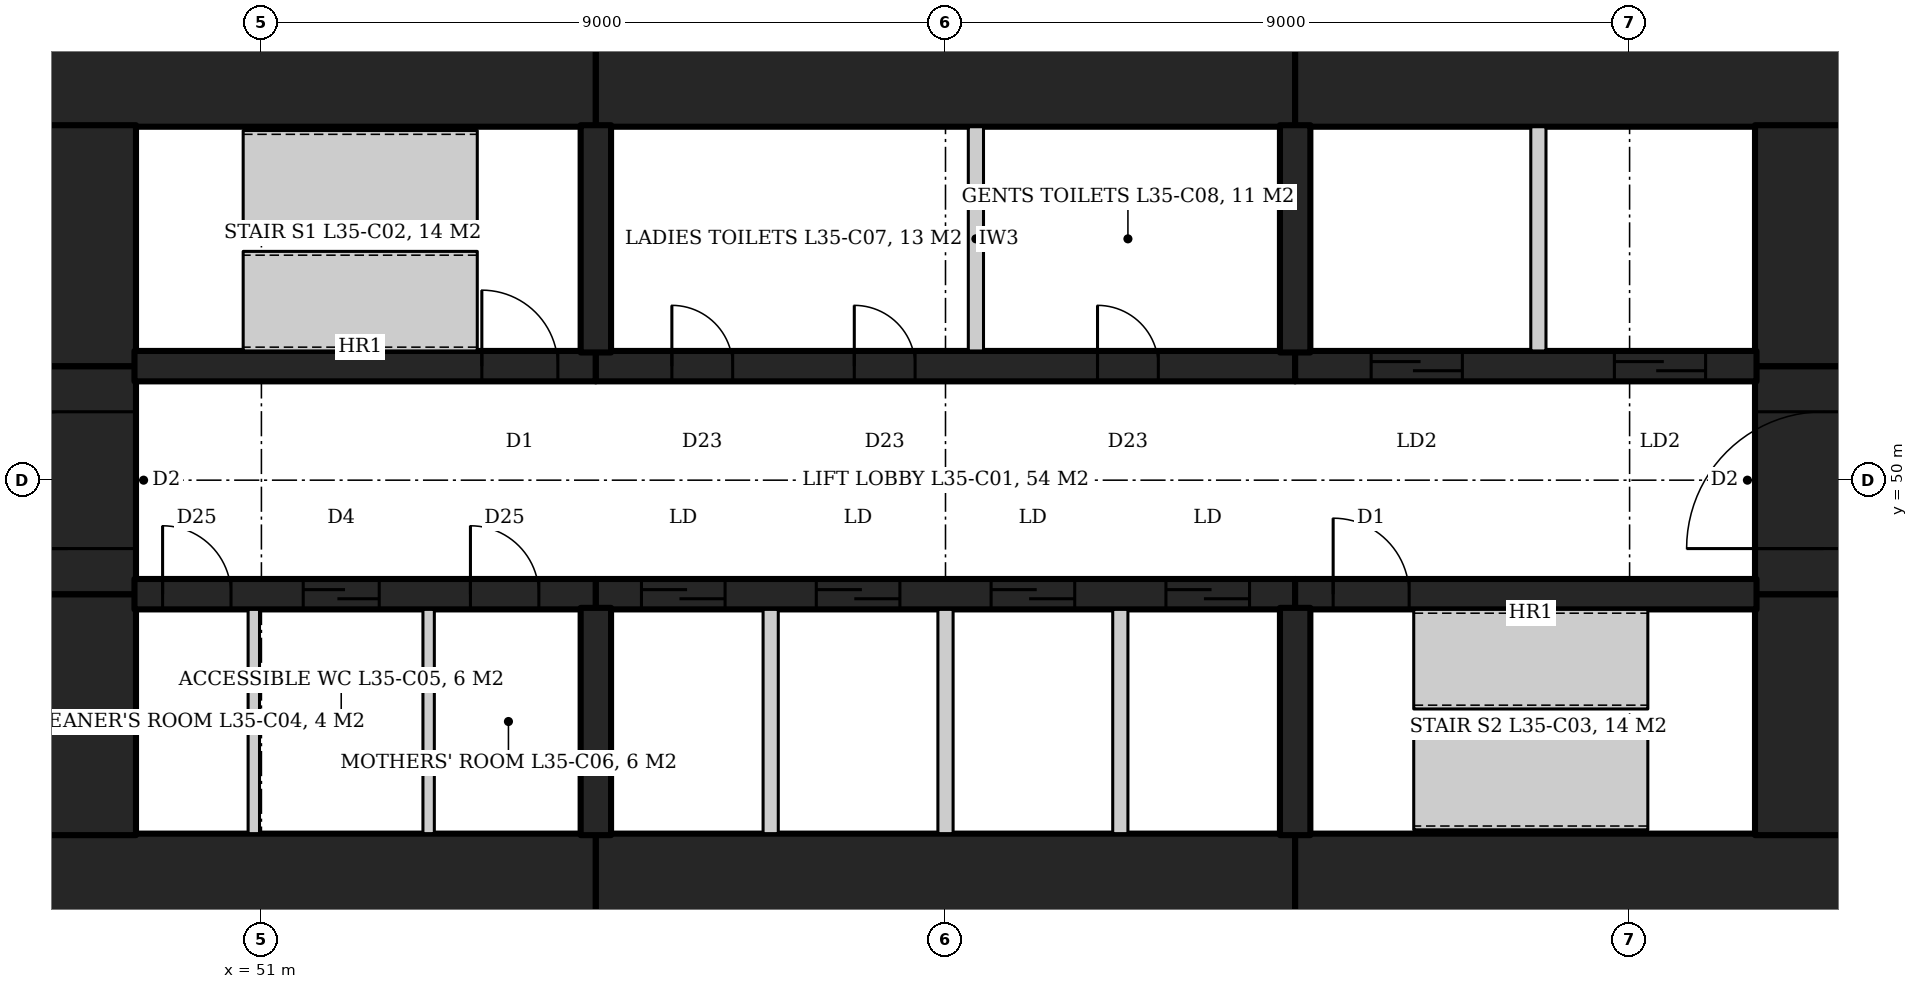
"""IFC4 building model, lengths in metres.
Left out: names, types, materials, properties, quantities, classifications, styles, units other than length and angle.
Written with IfcOpenShell. Run it as: python <this file> out.ifc"""

import sys

from ifc_helpers import new_model, si_unit, direction, frame, frame_2d, origin, place, context, subcontext, project, spatial, rectangle, extrude, element, fill, save


model = new_model("IFC4")
c1 = context("Model", 3, precision=1e-05, world=origin(), true_north=direction((0.0, 1.0)))
c2 = subcontext(c1, "Body", "Model", "MODEL_VIEW")
j1 = project(units=[si_unit("LENGTHUNIT", "METRE"), si_unit("PLANEANGLEUNIT", "RADIAN")], contexts=[c1])
p1 = place(None, origin())
s1 = spatial("IfcSite", under=j1, at=p1, CompositionType="ELEMENT")
p2 = place(p1, origin())
s2 = spatial("IfcBuilding", under=s1, at=p2, CompositionType="ELEMENT")
p3 = place(p2, frame((0.0, 0.0, 147.8)))
s3 = spatial("IfcBuildingStorey", under=s2, at=p3, CompositionType="ELEMENT", Elevation=147.8)
p4 = place(p3, frame((47.55, 55.55, 0.0), z_axis=(0.0, 0.0, 1.0), x_axis=(1.0, 0.0, 0.0)))
e1 = element("IfcWall", 1, at=p4, inside=s3, PredefinedType="SHEAR", context=c2, shape_type="SweptSolid", body=[
    extrude(rectangle(XDim=7.85, YDim=1.8, at=frame_2d((3.925, 0.0))), origin(), (0.0, 0.0, 1.0), 4.2),
])
p5 = place(p3, frame((55.4, 55.55, 0.0), z_axis=(0.0, 0.0, 1.0), x_axis=(1.0, 0.0, 0.0)))
e2 = element("IfcWall", 2, at=p5, inside=s3, PredefinedType="SHEAR", context=c2, shape_type="SweptSolid", body=[
    extrude(rectangle(XDim=9.2, YDim=1.8, at=frame_2d((4.6, 0.0))), origin(), (0.0, 0.0, 1.0), 4.2),
])
for number, where, z_axis, x_axis in (
    (3, (64.6, 55.55, 0.0), (0.0, 0.0, 1.0), (1.0, 0.0, 0.0)),
    (4, (47.55, 44.45, 0.0), (0.0, 0.0, 1.0), (1.0, 0.0, 0.0)),
):
    element("IfcWall", number, at=place(p3, frame(where, z_axis=z_axis, x_axis=x_axis)), inside=s3, PredefinedType="SHEAR", context=c2, shape_type="SweptSolid", body=[
        extrude(rectangle(XDim=7.85, YDim=1.8, at=frame_2d((3.925, 0.0))), origin(), (0.0, 0.0, 1.0), 4.2),
    ])
p6 = place(p3, frame((55.4, 44.45, 0.0), z_axis=(0.0, 0.0, 1.0), x_axis=(1.0, 0.0, 0.0)))
e5 = element("IfcWall", 5, at=p6, inside=s3, PredefinedType="SHEAR", context=c2, shape_type="SweptSolid", body=[
    extrude(rectangle(XDim=9.2, YDim=1.8, at=frame_2d((4.6, 0.0))), origin(), (0.0, 0.0, 1.0), 4.2),
])
p7 = place(p3, frame((64.6, 44.45, 0.0), z_axis=(0.0, 0.0, 1.0), x_axis=(1.0, 0.0, 0.0)))
e6 = element("IfcWall", 6, at=p7, inside=s3, PredefinedType="SHEAR", context=c2, shape_type="SweptSolid", body=[
    extrude(rectangle(XDim=7.85, YDim=1.8, at=frame_2d((3.925, 0.0))), origin(), (0.0, 0.0, 1.0), 4.2),
])
p8 = place(p3, frame((71.55, 45.33, 0.0), z_axis=(0.0, 0.0, 1.0), x_axis=(0.0, 1.0, 0.0)))
e7 = element("IfcWall", 7, at=p8, inside=s3, PredefinedType="SHEAR", context=c2, shape_type="SweptSolid", body=[
    extrude(rectangle(XDim=3.17, YDim=1.8, at=frame_2d((1.585, 0.0))), origin(), (0.0, 0.0, 1.0), 4.2),
])
p9 = place(p3, frame((71.55, 48.5, 0.0), z_axis=(0.0, 0.0, 1.0), x_axis=(0.0, 1.0, 0.0)))
e8 = element("IfcWall", 8, at=p9, inside=s3, PredefinedType="SHEAR", context=c2, shape_type="SweptSolid", body=[
    extrude(rectangle(XDim=3.0, YDim=1.8, at=frame_2d((1.5, 0.0))), origin(), (0.0, 0.0, 1.0), 4.2),
])
p10 = place(p9, frame((0.6, 0.0, 0.0)))
e9 = element("IfcOpeningElement", 9, at=p10, cuts=e8, PredefinedType="OPENING", context=c2, shape_type="SweptSolid", body=[
    extrude(rectangle(XDim=1.8, YDim=2.1, at=frame_2d((0.9, 1.05))), frame((0.0, 0.91, 0.0), z_axis=(0.0, -1.0, 0.0), x_axis=(1.0, 0.0, 0.0)), (0.0, 0.0, 1.0), 1.82),
])
for number, where, z_axis, x_axis in (
    (10, (71.55, 51.5, 0.0), (0.0, 0.0, 1.0), (0.0, 1.0, 0.0)),
    (11, (48.45, 45.33, 0.0), (0.0, 0.0, 1.0), (0.0, 1.0, 0.0)),
):
    element("IfcWall", number, at=place(p3, frame(where, z_axis=z_axis, x_axis=x_axis)), inside=s3, PredefinedType="SHEAR", context=c2, shape_type="SweptSolid", body=[
        extrude(rectangle(XDim=3.17, YDim=1.8, at=frame_2d((1.585, 0.0))), origin(), (0.0, 0.0, 1.0), 4.2),
    ])
p11 = place(p3, frame((48.45, 48.5, 0.0), z_axis=(0.0, 0.0, 1.0), x_axis=(0.0, 1.0, 0.0)))
e12 = element("IfcWall", 12, at=p11, inside=s3, PredefinedType="SHEAR", context=c2, shape_type="SweptSolid", body=[
    extrude(rectangle(XDim=3.0, YDim=1.8, at=frame_2d((1.5, 0.0))), origin(), (0.0, 0.0, 1.0), 4.2),
])
p12 = place(p11, frame((0.6, 0.0, 0.0)))
e13 = element("IfcOpeningElement", 13, at=p12, cuts=e12, PredefinedType="OPENING", context=c2, shape_type="SweptSolid", body=[
    extrude(rectangle(XDim=1.8, YDim=2.1, at=frame_2d((0.9, 1.05))), frame((0.0, 0.91, 0.0), z_axis=(0.0, -1.0, 0.0), x_axis=(1.0, 0.0, 0.0)), (0.0, 0.0, 1.0), 1.82),
])
p13 = place(p3, frame((48.45, 51.5, 0.0), z_axis=(0.0, 0.0, 1.0), x_axis=(0.0, 1.0, 0.0)))
e14 = element("IfcWall", 14, at=p13, inside=s3, PredefinedType="SHEAR", context=c2, shape_type="SweptSolid", body=[
    extrude(rectangle(XDim=3.17, YDim=1.8, at=frame_2d((1.585, 0.0))), origin(), (0.0, 0.0, 1.0), 4.2),
])
p14 = place(p3, frame((49.33, 51.5, 0.0), z_axis=(0.0, 0.0, 1.0), x_axis=(1.0, 0.0, 0.0)))
e15 = element("IfcWall", 15, at=p14, inside=s3, PredefinedType="SHEAR", context=c2, shape_type="SweptSolid", body=[
    extrude(rectangle(XDim=6.07, YDim=0.4, at=frame_2d((3.035, 0.0))), origin(), (0.0, 0.0, 1.0), 4.2),
])
p15 = place(p14, frame((4.57, 0.0, 0.0)))
e16 = element("IfcOpeningElement", 16, at=p15, cuts=e15, PredefinedType="OPENING", context=c2, shape_type="SweptSolid", body=[
    extrude(rectangle(XDim=1.0, YDim=2.1, at=frame_2d((0.5, 1.05))), frame((0.0, 0.21, 0.0), z_axis=(0.0, -1.0, 0.0), x_axis=(1.0, 0.0, 0.0)), (0.0, 0.0, 1.0), 0.42),
])
p16 = place(p3, frame((55.4, 51.5, 0.0), z_axis=(0.0, 0.0, 1.0), x_axis=(1.0, 0.0, 0.0)))
e17 = element("IfcWall", 17, at=p16, inside=s3, PredefinedType="SHEAR", context=c2, shape_type="SweptSolid", body=[
    extrude(rectangle(XDim=9.2, YDim=0.4, at=frame_2d((4.6, 0.0))), origin(), (0.0, 0.0, 1.0), 4.2),
])
p17 = place(p16, frame((1.0, 0.0, 0.0)))
e18 = element("IfcOpeningElement", 18, at=p17, cuts=e17, PredefinedType="OPENING", context=c2, shape_type="SweptSolid", body=[
    extrude(rectangle(XDim=0.8, YDim=2.1, at=frame_2d((0.4, 1.05))), frame((0.0, 0.21, 0.0), z_axis=(0.0, -1.0, 0.0), x_axis=(1.0, 0.0, 0.0)), (0.0, 0.0, 1.0), 0.42),
])
p18 = place(p16, frame((3.4, 0.0, 0.0)))
e19 = element("IfcOpeningElement", 19, at=p18, cuts=e17, PredefinedType="OPENING", context=c2, shape_type="SweptSolid", body=[
    extrude(rectangle(XDim=0.8, YDim=2.1, at=frame_2d((0.4, 1.05))), frame((0.0, 0.21, 0.0), z_axis=(0.0, -1.0, 0.0), x_axis=(1.0, 0.0, 0.0)), (0.0, 0.0, 1.0), 0.42),
])
p19 = place(p16, frame((6.6, 0.0, 0.0)))
e20 = element("IfcOpeningElement", 20, at=p19, cuts=e17, PredefinedType="OPENING", context=c2, shape_type="SweptSolid", body=[
    extrude(rectangle(XDim=0.8, YDim=2.1, at=frame_2d((0.4, 1.05))), frame((0.0, 0.21, 0.0), z_axis=(0.0, -1.0, 0.0), x_axis=(1.0, 0.0, 0.0)), (0.0, 0.0, 1.0), 0.42),
])
p20 = place(p3, frame((64.6, 51.5, 0.0), z_axis=(0.0, 0.0, 1.0), x_axis=(1.0, 0.0, 0.0)))
e21 = element("IfcWall", 21, at=p20, inside=s3, PredefinedType="SHEAR", context=c2, shape_type="SweptSolid", body=[
    extrude(rectangle(XDim=6.07, YDim=0.4, at=frame_2d((3.035, 0.0))), origin(), (0.0, 0.0, 1.0), 4.2),
])
p21 = place(p20, frame((1.0, 0.0, 0.0)))
e22 = element("IfcOpeningElement", 22, at=p21, cuts=e21, PredefinedType="OPENING", context=c2, shape_type="SweptSolid", body=[
    extrude(rectangle(XDim=1.2, YDim=2.1, at=frame_2d((0.6, 1.05))), frame((0.0, 0.21, 0.0), z_axis=(0.0, -1.0, 0.0), x_axis=(1.0, 0.0, 0.0)), (0.0, 0.0, 1.0), 0.42),
])
p22 = place(p20, frame((4.2, 0.0, 0.0)))
e23 = element("IfcOpeningElement", 23, at=p22, cuts=e21, PredefinedType="OPENING", context=c2, shape_type="SweptSolid", body=[
    extrude(rectangle(XDim=1.2, YDim=2.1, at=frame_2d((0.6, 1.05))), frame((0.0, 0.21, 0.0), z_axis=(0.0, -1.0, 0.0), x_axis=(1.0, 0.0, 0.0)), (0.0, 0.0, 1.0), 0.42),
])
p23 = place(p3, frame((49.33, 48.5, 0.0), z_axis=(0.0, 0.0, 1.0), x_axis=(1.0, 0.0, 0.0)))
e24 = element("IfcWall", 24, at=p23, inside=s3, PredefinedType="SHEAR", context=c2, shape_type="SweptSolid", body=[
    extrude(rectangle(XDim=6.07, YDim=0.4, at=frame_2d((3.035, 0.0))), origin(), (0.0, 0.0, 1.0), 4.2),
])
p24 = place(p23, frame((0.37, 0.0, 0.0)))
e25 = element("IfcOpeningElement", 25, at=p24, cuts=e24, PredefinedType="OPENING", context=c2, shape_type="SweptSolid", body=[
    extrude(rectangle(XDim=0.9, YDim=2.1, at=frame_2d((0.45, 1.05))), frame((0.0, 0.21, 0.0), z_axis=(0.0, -1.0, 0.0), x_axis=(1.0, 0.0, 0.0)), (0.0, 0.0, 1.0), 0.42),
])
p25 = place(p23, frame((2.22, 0.0, 0.0)))
e26 = element("IfcOpeningElement", 26, at=p25, cuts=e24, PredefinedType="OPENING", context=c2, shape_type="SweptSolid", body=[
    extrude(rectangle(XDim=1.0, YDim=2.1, at=frame_2d((0.5, 1.05))), frame((0.0, 0.21, 0.0), z_axis=(0.0, -1.0, 0.0), x_axis=(1.0, 0.0, 0.0)), (0.0, 0.0, 1.0), 0.42),
])
p26 = place(p23, frame((4.42, 0.0, 0.0)))
e27 = element("IfcOpeningElement", 27, at=p26, cuts=e24, PredefinedType="OPENING", context=c2, shape_type="SweptSolid", body=[
    extrude(rectangle(XDim=0.9, YDim=2.1, at=frame_2d((0.45, 1.05))), frame((0.0, 0.21, 0.0), z_axis=(0.0, -1.0, 0.0), x_axis=(1.0, 0.0, 0.0)), (0.0, 0.0, 1.0), 0.42),
])
p27 = place(p3, frame((55.4, 48.5, 0.0), z_axis=(0.0, 0.0, 1.0), x_axis=(1.0, 0.0, 0.0)))
e28 = element("IfcWall", 28, at=p27, inside=s3, PredefinedType="SHEAR", context=c2, shape_type="SweptSolid", body=[
    extrude(rectangle(XDim=9.2, YDim=0.4, at=frame_2d((4.6, 0.0))), origin(), (0.0, 0.0, 1.0), 4.2),
])
p28 = place(p27, frame((0.6, 0.0, 0.0)))
e29 = element("IfcOpeningElement", 29, at=p28, cuts=e28, PredefinedType="OPENING", context=c2, shape_type="SweptSolid", body=[
    extrude(rectangle(XDim=1.1, YDim=2.1, at=frame_2d((0.55, 1.05))), frame((0.0, 0.21, 0.0), z_axis=(0.0, -1.0, 0.0), x_axis=(1.0, 0.0, 0.0)), (0.0, 0.0, 1.0), 0.42),
])
p29 = place(p27, frame((2.9, 0.0, 0.0)))
e30 = element("IfcOpeningElement", 30, at=p29, cuts=e28, PredefinedType="OPENING", context=c2, shape_type="SweptSolid", body=[
    extrude(rectangle(XDim=1.1, YDim=2.1, at=frame_2d((0.55, 1.05))), frame((0.0, 0.21, 0.0), z_axis=(0.0, -1.0, 0.0), x_axis=(1.0, 0.0, 0.0)), (0.0, 0.0, 1.0), 0.42),
])
p30 = place(p27, frame((5.2, 0.0, 0.0)))
e31 = element("IfcOpeningElement", 31, at=p30, cuts=e28, PredefinedType="OPENING", context=c2, shape_type="SweptSolid", body=[
    extrude(rectangle(XDim=1.1, YDim=2.1, at=frame_2d((0.55, 1.05))), frame((0.0, 0.21, 0.0), z_axis=(0.0, -1.0, 0.0), x_axis=(1.0, 0.0, 0.0)), (0.0, 0.0, 1.0), 0.42),
])
p31 = place(p27, frame((7.5, 0.0, 0.0)))
e32 = element("IfcOpeningElement", 32, at=p31, cuts=e28, PredefinedType="OPENING", context=c2, shape_type="SweptSolid", body=[
    extrude(rectangle(XDim=1.1, YDim=2.1, at=frame_2d((0.55, 1.05))), frame((0.0, 0.21, 0.0), z_axis=(0.0, -1.0, 0.0), x_axis=(1.0, 0.0, 0.0)), (0.0, 0.0, 1.0), 0.42),
])
p32 = place(p3, frame((64.6, 48.5, 0.0), z_axis=(0.0, 0.0, 1.0), x_axis=(1.0, 0.0, 0.0)))
e33 = element("IfcWall", 33, at=p32, inside=s3, PredefinedType="SHEAR", context=c2, shape_type="SweptSolid", body=[
    extrude(rectangle(XDim=6.07, YDim=0.4, at=frame_2d((3.035, 0.0))), origin(), (0.0, 0.0, 1.0), 4.2),
])
p33 = place(p32, frame((0.5, 0.0, 0.0)))
e34 = element("IfcOpeningElement", 34, at=p33, cuts=e33, PredefinedType="OPENING", context=c2, shape_type="SweptSolid", body=[
    extrude(rectangle(XDim=1.0, YDim=2.1, at=frame_2d((0.5, 1.05))), frame((0.0, 0.21, 0.0), z_axis=(0.0, -1.0, 0.0), x_axis=(1.0, 0.0, 0.0)), (0.0, 0.0, 1.0), 0.42),
])
for number, where, z_axis, x_axis in (
    (35, (55.4, 51.68, 0.0), (0.0, 0.0, 1.0), (0.0, 1.0, 0.0)),
    (36, (64.6, 51.68, 0.0), (0.0, 0.0, 1.0), (0.0, 1.0, 0.0)),
    (37, (55.4, 48.32, 0.0), (0.0, 0.0, 1.0), (0.0, -1.0, 0.0)),
    (38, (64.6, 48.32, 0.0), (0.0, 0.0, 1.0), (0.0, -1.0, 0.0)),
):
    element("IfcWall", number, at=place(p3, frame(where, z_axis=z_axis, x_axis=x_axis)), inside=s3, PredefinedType="SHEAR", context=c2, shape_type="SweptSolid", body=[
        extrude(rectangle(XDim=2.99, YDim=0.4, at=frame_2d((1.495, 0.0))), origin(), (0.0, 0.0, 1.0), 4.2),
    ])
for number, where, z_axis, x_axis in (
    (39, (57.7, 45.35, 0.0), (0.0, 0.0, 1.0), (0.0, 1.0, 0.0)),
    (40, (60.0, 45.35, 0.0), (0.0, 0.0, 1.0), (0.0, 1.0, 0.0)),
    (41, (62.3, 45.35, 0.0), (0.0, 0.0, 1.0), (0.0, 1.0, 0.0)),
    (42, (67.8, 51.7, 0.0), (0.0, 0.0, 1.0), (0.0, 1.0, 0.0)),
):
    element("IfcWall", number, at=place(p3, frame(where, z_axis=z_axis, x_axis=x_axis)), inside=s3, PredefinedType="PARTITIONING", context=c2, shape_type="SweptSolid", body=[
        extrude(rectangle(XDim=2.95, YDim=0.2, at=frame_2d((1.475, 0.0))), origin(), (0.0, 0.0, 1.0), 4.2),
    ])
for number, where, z_axis, x_axis in (
    (43, (50.9, 45.35, 0.0), (0.0, 0.0, 1.0), (0.0, 1.0, 0.0)),
    (44, (53.2, 45.35, 0.0), (0.0, 0.0, 1.0), (0.0, 1.0, 0.0)),
):
    element("IfcWall", number, at=place(p3, frame(where, z_axis=z_axis, x_axis=x_axis)), inside=s3, PredefinedType="PARTITIONING", context=c2, shape_type="SweptSolid", body=[
        extrude(rectangle(XDim=2.95, YDim=0.15, at=frame_2d((1.475, 0.0))), origin(), (0.0, 0.0, 1.0), 4.04),
    ])
p34 = place(p3, frame((60.4, 51.7, 0.0), z_axis=(0.0, 0.0, 1.0), x_axis=(0.0, 1.0, 0.0)))
e45 = element("IfcWall", 45, at=p34, inside=s3, PredefinedType="PARTITIONING", context=c2, shape_type="SweptSolid", body=[
    extrude(rectangle(XDim=2.95, YDim=0.2, at=frame_2d((1.475, 0.0))), origin(), (0.0, 0.0, 1.0), 4.04),
])
p35 = place(p15, origin())
e46 = element("IfcDoor", 46, at=p35, inside=s3, OperationType="SINGLE_SWING_LEFT", PredefinedType="DOOR", context=c2, shape_type="SweptSolid", body=[
    extrude(rectangle(XDim=1.0, YDim=2.1, at=frame_2d((0.5, 1.05))), frame((0.0, 0.025, 0.0), z_axis=(0.0, -1.0, 0.0), x_axis=(1.0, 0.0, 0.0)), (0.0, 0.0, 1.0), 0.05),
])
fill(e16, e46)
p36 = place(p33, origin())
e47 = element("IfcDoor", 47, at=p36, inside=s3, OperationType="SINGLE_SWING_LEFT", PredefinedType="DOOR", context=c2, shape_type="SweptSolid", body=[
    extrude(rectangle(XDim=1.0, YDim=2.1, at=frame_2d((0.5, 1.05))), frame((0.0, 0.025, 0.0), z_axis=(0.0, -1.0, 0.0), x_axis=(1.0, 0.0, 0.0)), (0.0, 0.0, 1.0), 0.05),
])
fill(e34, e47)
p37 = place(p21, origin())
e48 = element("IfcDoor", 48, at=p37, inside=s3, OperationType="SLIDING_TO_LEFT", PredefinedType="DOOR", context=c2, shape_type="SweptSolid", body=[
    extrude(rectangle(XDim=1.2, YDim=2.1, at=frame_2d((0.6, 1.05))), frame((0.0, 0.025, 0.0), z_axis=(0.0, -1.0, 0.0), x_axis=(1.0, 0.0, 0.0)), (0.0, 0.0, 1.0), 0.05),
])
fill(e22, e48)
p38 = place(p22, origin())
e49 = element("IfcDoor", 49, at=p38, inside=s3, OperationType="SLIDING_TO_LEFT", PredefinedType="DOOR", context=c2, shape_type="SweptSolid", body=[
    extrude(rectangle(XDim=1.2, YDim=2.1, at=frame_2d((0.6, 1.05))), frame((0.0, 0.025, 0.0), z_axis=(0.0, -1.0, 0.0), x_axis=(1.0, 0.0, 0.0)), (0.0, 0.0, 1.0), 0.05),
])
fill(e23, e49)
p39 = place(p28, origin())
e50 = element("IfcDoor", 50, at=p39, inside=s3, OperationType="SLIDING_TO_LEFT", PredefinedType="DOOR", context=c2, shape_type="SweptSolid", body=[
    extrude(rectangle(XDim=1.1, YDim=2.1, at=frame_2d((0.55, 1.05))), frame((0.0, 0.025, 0.0), z_axis=(0.0, -1.0, 0.0), x_axis=(1.0, 0.0, 0.0)), (0.0, 0.0, 1.0), 0.05),
])
fill(e29, e50)
p40 = place(p29, origin())
e51 = element("IfcDoor", 51, at=p40, inside=s3, OperationType="SLIDING_TO_LEFT", PredefinedType="DOOR", context=c2, shape_type="SweptSolid", body=[
    extrude(rectangle(XDim=1.1, YDim=2.1, at=frame_2d((0.55, 1.05))), frame((0.0, 0.025, 0.0), z_axis=(0.0, -1.0, 0.0), x_axis=(1.0, 0.0, 0.0)), (0.0, 0.0, 1.0), 0.05),
])
fill(e30, e51)
p41 = place(p30, origin())
e52 = element("IfcDoor", 52, at=p41, inside=s3, OperationType="SLIDING_TO_LEFT", PredefinedType="DOOR", context=c2, shape_type="SweptSolid", body=[
    extrude(rectangle(XDim=1.1, YDim=2.1, at=frame_2d((0.55, 1.05))), frame((0.0, 0.025, 0.0), z_axis=(0.0, -1.0, 0.0), x_axis=(1.0, 0.0, 0.0)), (0.0, 0.0, 1.0), 0.05),
])
fill(e31, e52)
p42 = place(p31, origin())
e53 = element("IfcDoor", 53, at=p42, inside=s3, OperationType="SLIDING_TO_LEFT", PredefinedType="DOOR", context=c2, shape_type="SweptSolid", body=[
    extrude(rectangle(XDim=1.1, YDim=2.1, at=frame_2d((0.55, 1.05))), frame((0.0, 0.025, 0.0), z_axis=(0.0, -1.0, 0.0), x_axis=(1.0, 0.0, 0.0)), (0.0, 0.0, 1.0), 0.05),
])
fill(e32, e53)
p43 = place(p24, origin())
e54 = element("IfcDoor", 54, at=p43, inside=s3, OperationType="SINGLE_SWING_RIGHT", PredefinedType="DOOR", context=c2, shape_type="SweptSolid", body=[
    extrude(rectangle(XDim=0.9, YDim=2.1, at=frame_2d((0.45, 1.05))), frame((0.0, 0.025, 0.0), z_axis=(0.0, -1.0, 0.0), x_axis=(1.0, 0.0, 0.0)), (0.0, 0.0, 1.0), 0.05),
])
fill(e25, e54)
p44 = place(p25, origin())
e55 = element("IfcDoor", 55, at=p44, inside=s3, OperationType="SLIDING_TO_LEFT", PredefinedType="DOOR", context=c2, shape_type="SweptSolid", body=[
    extrude(rectangle(XDim=1.0, YDim=2.1, at=frame_2d((0.5, 1.05))), frame((0.0, 0.025, 0.0), z_axis=(0.0, -1.0, 0.0), x_axis=(1.0, 0.0, 0.0)), (0.0, 0.0, 1.0), 0.05),
])
fill(e26, e55)
p45 = place(p26, origin())
e56 = element("IfcDoor", 56, at=p45, inside=s3, OperationType="SINGLE_SWING_RIGHT", PredefinedType="DOOR", context=c2, shape_type="SweptSolid", body=[
    extrude(rectangle(XDim=0.9, YDim=2.1, at=frame_2d((0.45, 1.05))), frame((0.0, 0.025, 0.0), z_axis=(0.0, -1.0, 0.0), x_axis=(1.0, 0.0, 0.0)), (0.0, 0.0, 1.0), 0.05),
])
fill(e27, e56)
p46 = place(p10, origin())
e57 = element("IfcDoor", 57, at=p46, inside=s3, OperationType="DOUBLE_DOOR_DOUBLE_SWING", PredefinedType="DOOR", context=c2, shape_type="SweptSolid", body=[
    extrude(rectangle(XDim=1.8, YDim=2.1, at=frame_2d((0.9, 1.05))), frame((0.0, 0.025, 0.0), z_axis=(0.0, -1.0, 0.0), x_axis=(1.0, 0.0, 0.0)), (0.0, 0.0, 1.0), 0.05),
])
fill(e9, e57)
p47 = place(p12, origin())
e58 = element("IfcDoor", 58, at=p47, inside=s3, OperationType="DOUBLE_DOOR_DOUBLE_SWING", PredefinedType="DOOR", context=c2, shape_type="SweptSolid", body=[
    extrude(rectangle(XDim=1.8, YDim=2.1, at=frame_2d((0.9, 1.05))), frame((0.0, 0.025, 0.0), z_axis=(0.0, -1.0, 0.0), x_axis=(1.0, 0.0, 0.0)), (0.0, 0.0, 1.0), 0.05),
])
fill(e13, e58)
p48 = place(p17, origin())
e59 = element("IfcDoor", 59, at=p48, inside=s3, OperationType="SINGLE_SWING_LEFT", PredefinedType="DOOR", context=c2, shape_type="SweptSolid", body=[
    extrude(rectangle(XDim=0.8, YDim=2.1, at=frame_2d((0.4, 1.05))), frame((0.0, 0.025, 0.0), z_axis=(0.0, -1.0, 0.0), x_axis=(1.0, 0.0, 0.0)), (0.0, 0.0, 1.0), 0.05),
])
fill(e18, e59)
p49 = place(p18, origin())
e60 = element("IfcDoor", 60, at=p49, inside=s3, OperationType="SINGLE_SWING_LEFT", PredefinedType="DOOR", context=c2, shape_type="SweptSolid", body=[
    extrude(rectangle(XDim=0.8, YDim=2.1, at=frame_2d((0.4, 1.05))), frame((0.0, 0.025, 0.0), z_axis=(0.0, -1.0, 0.0), x_axis=(1.0, 0.0, 0.0)), (0.0, 0.0, 1.0), 0.05),
])
fill(e19, e60)
p50 = place(p19, origin())
e61 = element("IfcDoor", 61, at=p50, inside=s3, OperationType="SINGLE_SWING_LEFT", PredefinedType="DOOR", context=c2, shape_type="SweptSolid", body=[
    extrude(rectangle(XDim=0.8, YDim=2.1, at=frame_2d((0.4, 1.05))), frame((0.0, 0.025, 0.0), z_axis=(0.0, -1.0, 0.0), x_axis=(1.0, 0.0, 0.0)), (0.0, 0.0, 1.0), 0.05),
])
fill(e20, e61)
save(model, sys.argv[1])
